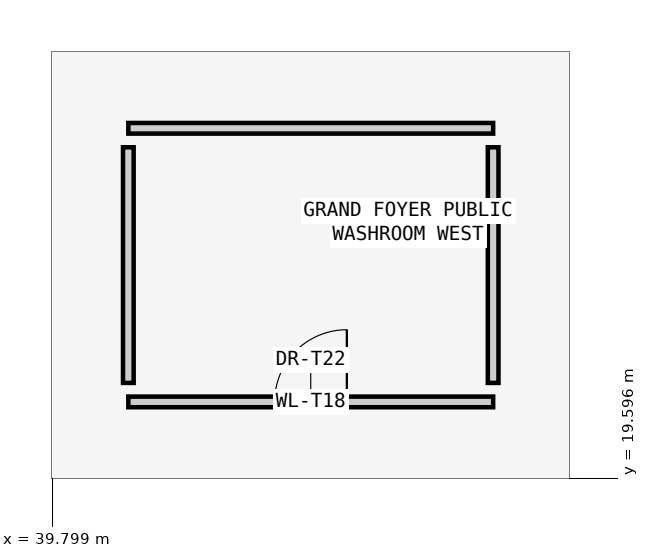
"""IFC4 building model, lengths in metres.
Left out: names, types, materials, properties, quantities, classifications, styles, units other than length and angle.
Written with IfcOpenShell. Run it as: python <this file> out.ifc"""

import sys

from ifc_helpers import new_model, si_unit, direction, frame, frame_2d, origin, place, context, subcontext, project, spatial, rectangle, extrude, element, fill, save


model = new_model("IFC4")
c1 = context("Model", 3, precision=1e-05, world=origin(), true_north=direction((0.0, 1.0)))
c2 = subcontext(c1, "Body", "Model", "MODEL_VIEW")
j1 = project(units=[si_unit("LENGTHUNIT", "METRE"), si_unit("PLANEANGLEUNIT", "RADIAN")], contexts=[c1])
p1 = place(None, origin())
s1 = spatial("IfcSite", under=j1, at=p1, CompositionType="ELEMENT")
p2 = place(p1, origin())
s2 = spatial("IfcBuilding", under=s1, at=p2, CompositionType="ELEMENT")
p3 = place(p2, origin())
s3 = spatial("IfcBuildingStorey", under=s2, at=p3, CompositionType="ELEMENT", Elevation=0.0)
p4 = place(p3, frame((40.8, 20.6, 0.0), z_axis=(0.0, 0.0, 1.0), x_axis=(1.0, 0.0, 0.0)))
e1 = element("IfcWall", 1, at=p4, inside=s3, PredefinedType="PARTITIONING", context=c2, shape_type="SweptSolid", body=[
    extrude(rectangle(XDim=4.8, YDim=0.14, at=frame_2d((2.4, 0.0))), origin(), (0.0, 0.0, 1.0), 4.92),
])
p5 = place(p4, frame((1.925, 0.0, 0.0)))
e2 = element("IfcOpeningElement", 2, at=p5, cuts=e1, PredefinedType="OPENING", context=c2, shape_type="SweptSolid", body=[
    extrude(rectangle(XDim=0.95, YDim=2.15, at=frame_2d((0.475, 1.075))), frame((0.0, 0.08, 0.0), z_axis=(0.0, -1.0, 0.0), x_axis=(1.0, 0.0, 0.0)), (0.0, 0.0, 1.0), 0.16),
])
p6 = place(p3, frame((40.8, 24.2, 0.0), z_axis=(0.0, 0.0, 1.0), x_axis=(1.0, 0.0, 0.0)))
e3 = element("IfcWall", 3, at=p6, inside=s3, PredefinedType="PARTITIONING", context=c2, shape_type="SweptSolid", body=[
    extrude(rectangle(XDim=4.8, YDim=0.14, at=frame_2d((2.4, 0.0))), origin(), (0.0, 0.0, 1.0), 4.92),
])
for number, where, z_axis, x_axis in (
    (4, (40.8, 20.85, 0.0), (0.0, 0.0, 1.0), (0.0, 1.0, 0.0)),
    (5, (45.6, 20.85, 0.0), (0.0, 0.0, 1.0), (0.0, 1.0, 0.0)),
):
    element("IfcWall", number, at=place(p3, frame(where, z_axis=z_axis, x_axis=x_axis)), inside=s3, PredefinedType="PARTITIONING", context=c2, shape_type="SweptSolid", body=[
        extrude(rectangle(XDim=3.1, YDim=0.14, at=frame_2d((1.55, 0.0))), origin(), (0.0, 0.0, 1.0), 4.92),
    ])
p7 = place(p5, origin())
e6 = element("IfcDoor", 6, at=p7, inside=s3, OperationType="SINGLE_SWING_RIGHT", PredefinedType="DOOR", context=c2, shape_type="SweptSolid", body=[
    extrude(rectangle(XDim=0.95, YDim=2.15, at=frame_2d((0.475, 1.075))), frame((0.0, 0.025, 0.0), z_axis=(0.0, -1.0, 0.0), x_axis=(1.0, 0.0, 0.0)), (0.0, 0.0, 1.0), 0.05),
])
fill(e2, e6)
save(model, sys.argv[1])
